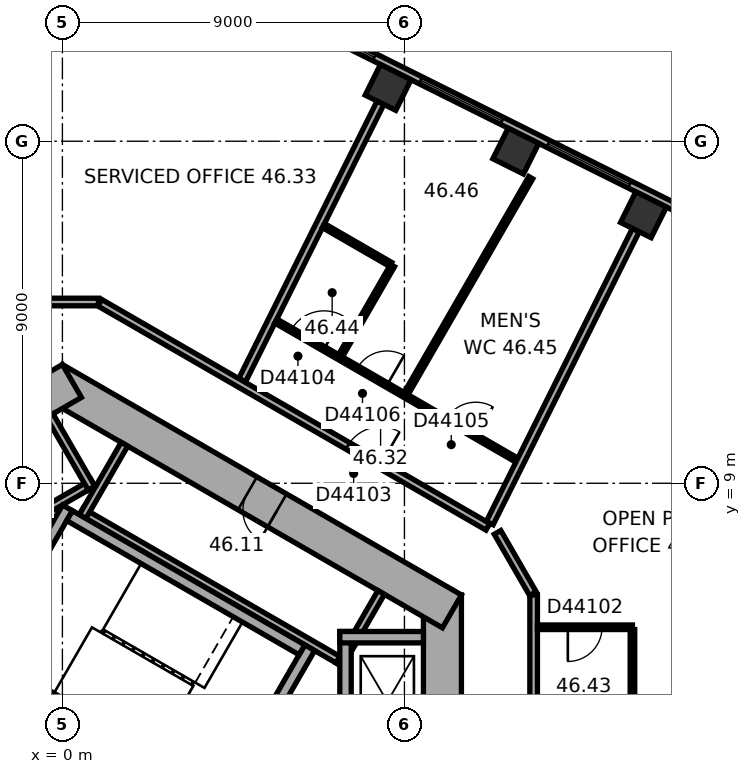
"""IFC4 building model, lengths in metres.
Left out: names, types, materials, properties, quantities, classifications, styles, units other than length and angle.
Written with IfcOpenShell. Run it as: python <this file> out.ifc"""

import sys

from ifc_helpers import new_model, si_unit, direction, frame, frame_2d, origin, origin_2d, place, context, subcontext, project, spatial, rectangle, extrude, element, fill, save


model = new_model("IFC4")
c1 = context("Model", 3, precision=1e-05, world=origin(), true_north=direction((0.0, 1.0)))
c2 = subcontext(c1, "Body", "Model", "MODEL_VIEW")
j1 = project(units=[si_unit("LENGTHUNIT", "METRE"), si_unit("PLANEANGLEUNIT", "RADIAN")], contexts=[c1])
p1 = place(None, origin())
s1 = spatial("IfcSite", under=j1, at=p1, CompositionType="ELEMENT")
p2 = place(p1, origin())
s2 = spatial("IfcBuilding", under=s1, at=p2, CompositionType="ELEMENT")
p3 = place(p2, frame((0.0, 0.0, 187.3)))
s3 = spatial("IfcBuildingStorey", under=s2, at=p3, CompositionType="ELEMENT", Elevation=187.3)
for number, where, z_axis, x_axis in (
    (1, (15.29, 16.065, 0.0), (0.0, 0.0, 1.0), (-0.895, 0.446, 0.0)),
    (2, (11.931, 17.74, 0.0), (0.0, 0.0, 1.0), (-0.895, 0.446, 0.0)),
    (3, (8.571, 19.416, 0.0), (0.0, 0.0, 1.0), (-0.895, 0.446, 0.0)),
):
    element("IfcColumn", number, at=place(p3, frame(where, z_axis=z_axis, x_axis=x_axis)), inside=s3, PredefinedType="COLUMN", context=c2, shape_type="SweptSolid", body=[
        extrude(rectangle(XDim=0.9, YDim=0.9, at=origin_2d()), origin(), (0.0, 0.0, 1.0), 3.7),
    ])
p4 = place(p3, frame((10.0, -6.062, 0.0), z_axis=(0.0, 0.0, 1.0), x_axis=(0.0, 1.0, 0.0)))
e4 = element("IfcWall", 4, at=p4, inside=s3, PredefinedType="SHEAR", context=c2, shape_type="SweptSolid", body=[
    extrude(rectangle(XDim=12.125, YDim=1.0, at=frame_2d((6.062, 0.0))), origin(), (0.0, 0.0, 1.0), 3.7),
])
p5 = place(p4, frame((6.262, 0.0, 0.0)))
e5 = element("IfcOpeningElement", 5, at=p5, cuts=e4, PredefinedType="OPENING", context=c2, shape_type="SweptSolid", body=[
    extrude(rectangle(XDim=1.5, YDim=2.1, at=frame_2d((0.75, 1.05))), frame((0.0, 0.51, 0.0), z_axis=(0.0, -1.0, 0.0), x_axis=(1.0, 0.0, 0.0)), (0.0, 0.0, 1.0), 1.02),
])
p6 = place(p4, frame((3.112, 0.0, 0.0)))
e6 = element("IfcOpeningElement", 6, at=p6, cuts=e4, PredefinedType="OPENING", context=c2, shape_type="SweptSolid", body=[
    extrude(rectangle(XDim=0.9, YDim=2.1, at=frame_2d((0.45, 1.05))), frame((0.0, 0.51, 0.0), z_axis=(0.0, -1.0, 0.0), x_axis=(1.0, 0.0, 0.0)), (0.0, 0.0, 1.0), 1.02),
])
p7 = place(p3, frame((10.25, 5.629, 0.0), z_axis=(0.0, 0.0, 1.0), x_axis=(-0.866022616891, 0.50000482701, 0.0)))
e7 = element("IfcWall", 7, at=p7, inside=s3, PredefinedType="SHEAR", context=c2, shape_type="SweptSolid", body=[
    extrude(rectangle(XDim=12.125, YDim=1.0, at=frame_2d((6.062, 0.0))), origin(), (0.0, 0.0, 1.0), 3.7),
])
p8 = place(p7, frame((5.312, 0.0, 0.0)))
e8 = element("IfcOpeningElement", 8, at=p8, cuts=e7, PredefinedType="OPENING", context=c2, shape_type="SweptSolid", body=[
    extrude(rectangle(XDim=0.9, YDim=2.1, at=frame_2d((0.45, 1.05))), frame((0.0, 0.51, 0.0), z_axis=(0.0, -1.0, 0.0), x_axis=(1.0, 0.0, 0.0)), (0.0, 0.0, 1.0), 1.02),
])
p9 = place(p3, frame((0.25, 11.691, 0.0), z_axis=(0.0, 0.0, 1.0), x_axis=(-0.866022616891, -0.50000482701, 0.0)))
e9 = element("IfcWall", 9, at=p9, inside=s3, PredefinedType="SHEAR", context=c2, shape_type="SweptSolid", body=[
    extrude(rectangle(XDim=12.125, YDim=1.0, at=frame_2d((6.062, 0.0))), origin(), (0.0, 0.0, 1.0), 3.7),
])
p10 = place(p9, frame((6.262, 0.0, 0.0)))
e10 = element("IfcOpeningElement", 10, at=p10, cuts=e9, PredefinedType="OPENING", context=c2, shape_type="SweptSolid", body=[
    extrude(rectangle(XDim=1.5, YDim=2.1, at=frame_2d((0.75, 1.05))), frame((0.0, 0.51, 0.0), z_axis=(0.0, -1.0, 0.0), x_axis=(1.0, 0.0, 0.0)), (0.0, 0.0, 1.0), 1.02),
])
p11 = place(p9, frame((1.812, 0.0, 0.0)))
e11 = element("IfcOpeningElement", 11, at=p11, cuts=e9, PredefinedType="OPENING", context=c2, shape_type="SweptSolid", body=[
    extrude(rectangle(XDim=0.9, YDim=2.1, at=frame_2d((0.45, 1.05))), frame((0.0, 0.51, 0.0), z_axis=(0.0, -1.0, 0.0), x_axis=(1.0, 0.0, 0.0)), (0.0, 0.0, 1.0), 1.02),
])
p12 = place(p9, frame((4.412, 0.0, 0.0)))
e12 = element("IfcOpeningElement", 12, at=p12, cuts=e9, PredefinedType="OPENING", context=c2, shape_type="SweptSolid", body=[
    extrude(rectangle(XDim=0.9, YDim=2.1, at=frame_2d((0.45, 1.05))), frame((0.0, 0.51, 0.0), z_axis=(0.0, -1.0, 0.0), x_axis=(1.0, 0.0, 0.0)), (0.0, 0.0, 1.0), 1.02),
])
p13 = place(p3, frame((19.464, 14.599, 0.0), z_axis=(0.0, 0.0, 1.0), x_axis=(-0.894935755043, 0.446195018289, 0.0)))
e13 = element("IfcWall", 13, at=p13, inside=s3, PredefinedType="STANDARD", context=c2, shape_type="SweptSolid", body=[
    extrude(rectangle(XDim=20.044, YDim=0.2, at=frame_2d((10.022, 0.0))), origin(), (0.0, 0.0, 1.0), 3.7),
])
p14 = place(p13, frame((1.313, 0.0, 0.9)))
e14 = element("IfcOpeningElement", 14, at=p14, cuts=e13, PredefinedType="OPENING", context=c2, shape_type="SweptSolid", body=[
    extrude(rectangle(XDim=2.4, YDim=2.0, at=frame_2d((1.2, 1.0))), frame((0.0, 0.11, 0.0), z_axis=(0.0, -1.0, 0.0), x_axis=(1.0, 0.0, 0.0)), (0.0, 0.0, 1.0), 0.22),
])
p15 = place(p13, frame((5.067, 0.0, 0.9)))
e15 = element("IfcOpeningElement", 15, at=p15, cuts=e13, PredefinedType="OPENING", context=c2, shape_type="SweptSolid", body=[
    extrude(rectangle(XDim=2.4, YDim=2.0, at=frame_2d((1.2, 1.0))), frame((0.0, 0.11, 0.0), z_axis=(0.0, -1.0, 0.0), x_axis=(1.0, 0.0, 0.0)), (0.0, 0.0, 1.0), 0.22),
])
p16 = place(p13, frame((8.821, 0.0, 0.9)))
e16 = element("IfcOpeningElement", 16, at=p16, cuts=e13, PredefinedType="OPENING", context=c2, shape_type="SweptSolid", body=[
    extrude(rectangle(XDim=2.4, YDim=2.0, at=frame_2d((1.2, 1.0))), frame((0.0, 0.11, 0.0), z_axis=(0.0, -1.0, 0.0), x_axis=(1.0, 0.0, 0.0)), (0.0, 0.0, 1.0), 0.22),
])
p17 = place(p13, frame((12.575, 0.0, 0.9)))
e17 = element("IfcOpeningElement", 17, at=p17, cuts=e13, PredefinedType="OPENING", context=c2, shape_type="SweptSolid", body=[
    extrude(rectangle(XDim=2.4, YDim=2.0, at=frame_2d((1.2, 1.0))), frame((0.0, 0.11, 0.0), z_axis=(0.0, -1.0, 0.0), x_axis=(1.0, 0.0, 0.0)), (0.0, 0.0, 1.0), 0.22),
])
p18 = place(p13, frame((16.329, 0.0, 0.9)))
e18 = element("IfcOpeningElement", 18, at=p18, cuts=e13, PredefinedType="OPENING", context=c2, shape_type="SweptSolid", body=[
    extrude(rectangle(XDim=2.4, YDim=2.0, at=frame_2d((1.2, 1.0))), frame((0.0, 0.11, 0.0), z_axis=(0.0, -1.0, 0.0), x_axis=(1.0, 0.0, 0.0)), (0.0, 0.0, 1.0), 0.22),
])
p19 = place(p3, frame((7.424, 4.259, 0.0), z_axis=(0.0, 0.0, 1.0), x_axis=(-0.866026010844, 0.49999894854, 0.0)))
e19 = element("IfcWall", 19, at=p19, inside=s3, PredefinedType="PARTITIONING", context=c2, shape_type="SweptSolid", body=[
    extrude(rectangle(XDim=8.0, YDim=0.2, at=frame_2d((4.0, 0.0))), origin(), (0.0, 0.0, 1.0), 3.42),
])
for number, where, z_axis, x_axis in (
    (20, (7.287, 4.222, 0.0), (0.0, 0.0, 1.0), (0.5, 0.866, 0.0)),
    (21, (0.532, 8.122, 0.0), (0.0, 0.0, 1.0), (0.5, 0.866, 0.0)),
):
    element("IfcWall", number, at=place(p3, frame(where, z_axis=z_axis, x_axis=x_axis)), inside=s3, PredefinedType="PARTITIONING", context=c2, shape_type="SweptSolid", body=[
        extrude(rectangle(XDim=2.2, YDim=0.2, at=frame_2d((1.1, 0.0))), origin(), (0.0, 0.0, 1.0), 3.42),
    ])
p20 = place(p3, frame((0.803, 9.009, 0.0), z_axis=(0.0, 0.0, 1.0), x_axis=(-0.866028230842, -0.499995103361, 0.0)))
e22 = element("IfcWall", 22, at=p20, inside=s3, PredefinedType="PARTITIONING", context=c2, shape_type="SweptSolid", body=[
    extrude(rectangle(XDim=5.4, YDim=0.2, at=frame_2d((2.7, 0.0))), origin(), (0.0, 0.0, 1.0), 3.42),
])
p21 = place(p3, frame((0.767, 8.872, 0.0), z_axis=(0.0, 0.0, 1.0), x_axis=(-0.499994660107, 0.866028486751, 0.0)))
e23 = element("IfcWall", 23, at=p21, inside=s3, PredefinedType="PARTITIONING", context=c2, shape_type="SweptSolid", body=[
    extrude(rectangle(XDim=2.2, YDim=0.2, at=frame_2d((1.1, 0.0))), origin(), (0.0, 0.0, 1.0), 3.42),
])
p22 = place(p3, frame((4.158, 0.602, 0.0), z_axis=(0.0, 0.0, 1.0), x_axis=(0.499977259774, 0.866038532462, 0.0)))
e24 = element("IfcWall", 24, at=p22, inside=s3, PredefinedType="SHEAR", context=c2, shape_type="SweptSolid", body=[
    extrude(rectangle(XDim=4.7, YDim=0.3, at=frame_2d((2.35, 0.0))), origin(), (0.0, 0.0, 1.0), 3.42),
])
p23 = place(p22, frame((0.8, 0.0, 0.0)))
e25 = element("IfcOpeningElement", 25, at=p23, cuts=e24, PredefinedType="OPENING", context=c2, shape_type="SweptSolid", body=[
    extrude(rectangle(XDim=1.2, YDim=2.1, at=frame_2d((0.6, 1.05))), frame((0.0, 0.16, 0.0), z_axis=(0.0, -1.0, 0.0), x_axis=(1.0, 0.0, 0.0)), (0.0, 0.0, 1.0), 0.32),
])
p24 = place(p3, frame((-2.216, 4.282, 0.0), z_axis=(0.0, 0.0, 1.0), x_axis=(0.499977259774, 0.866038532462, 0.0)))
e26 = element("IfcWall", 26, at=p24, inside=s3, PredefinedType="SHEAR", context=c2, shape_type="SweptSolid", body=[
    extrude(rectangle(XDim=4.7, YDim=0.3, at=frame_2d((2.35, 0.0))), origin(), (0.0, 0.0, 1.0), 3.42),
])
for number, where, z_axis, x_axis in (
    (27, (4.103, 0.807, 0.0), (0.0, 0.0, 1.0), (-0.866, 0.5, 0.0)),
    (28, (6.303, 4.617, 0.0), (0.0, 0.0, 1.0), (-0.866, 0.5, 0.0)),
):
    element("IfcWall", number, at=place(p3, frame(where, z_axis=z_axis, x_axis=x_axis)), inside=s3, PredefinedType="SHEAR", context=c2, shape_type="SweptSolid", body=[
        extrude(rectangle(XDim=7.06, YDim=0.3, at=frame_2d((3.53, 0.0))), origin(), (0.0, 0.0, 1.0), 3.42),
    ])
p25 = place(p3, frame((7.45, 1.75, 0.0), z_axis=(0.0, 0.0, 1.0), x_axis=(0.0, 1.0, 0.0)))
e29 = element("IfcWall", 29, at=p25, inside=s3, PredefinedType="SHEAR", context=c2, shape_type="SweptSolid", body=[
    extrude(rectangle(XDim=3.35, YDim=0.3, at=frame_2d((1.675, 0.0))), origin(), (0.0, 0.0, 1.0), 3.42),
])
p26 = place(p3, frame((7.3, 4.95, 0.0), z_axis=(0.0, 0.0, 1.0), x_axis=(1.0, 0.0, 0.0)))
e30 = element("IfcWall", 30, at=p26, inside=s3, PredefinedType="SHEAR", context=c2, shape_type="SweptSolid", body=[
    extrude(rectangle(XDim=2.2, YDim=0.3, at=frame_2d((1.1, 0.0))), origin(), (0.0, 0.0, 1.0), 3.42),
])
p27 = place(p3, frame((0.95, 13.77, 0.0), z_axis=(0.0, 0.0, 1.0), x_axis=(-1.0, 0.0, 0.0)))
e31 = element("IfcWall", 31, at=p27, inside=s3, PredefinedType="PARTITIONING", context=c2, shape_type="SweptSolid", body=[
    extrude(rectangle(XDim=1.9, YDim=0.2, at=frame_2d((0.95, 0.0))), origin(), (0.0, 0.0, 1.0), 3.42),
])
p28 = place(p3, frame((7.318, 12.356, 0.0), z_axis=(0.0, 0.0, 1.0), x_axis=(0.499982138324, 0.866035715982, 0.0)))
e32 = element("IfcWall", 32, at=p28, inside=s3, PredefinedType="PARTITIONING", context=c2, shape_type="SweptSolid", body=[
    extrude(rectangle(XDim=2.74, YDim=0.12, at=frame_2d((1.37, 0.0))), origin(), (0.0, 0.0, 1.0), 3.42),
])
p29 = place(p3, frame((8.37, 19.013, 0.0), z_axis=(0.0, 0.0, 1.0), x_axis=(-0.446183598632, -0.894941448538, 0.0)))
e33 = element("IfcWall", 33, at=p29, inside=s3, PredefinedType="PARTITIONING", context=c2, shape_type="SweptSolid", body=[
    extrude(rectangle(XDim=8.156, YDim=0.2, at=frame_2d((4.078, 0.0))), origin(), (0.0, 0.0, 1.0), 3.42),
])
p30 = place(p3, frame((8.636, 14.759, 0.0), z_axis=(0.0, 0.0, 1.0), x_axis=(-0.866010195725, 0.500026340207, 0.0)))
e34 = element("IfcWall", 34, at=p30, inside=s3, PredefinedType="PARTITIONING", context=c2, shape_type="SweptSolid", body=[
    extrude(rectangle(XDim=2.04, YDim=0.12, at=frame_2d((1.02, 0.0))), origin(), (0.0, 0.0, 1.0), 3.42),
])
p31 = place(p3, frame((11.196, 7.854, 0.0), z_axis=(0.0, 0.0, 1.0), x_axis=(-0.866023877043, 0.500002644385, 0.0)))
e35 = element("IfcWall", 35, at=p31, inside=s3, PredefinedType="PARTITIONING", context=c2, shape_type="SweptSolid", body=[
    extrude(rectangle(XDim=11.792, YDim=0.2, at=frame_2d((5.896, 0.0))), origin(), (0.0, 0.0, 1.0), 3.42),
])
p32 = place(p31, frame((3.261, 0.0, 0.0)))
e36 = element("IfcOpeningElement", 36, at=p32, cuts=e35, PredefinedType="OPENING", context=c2, shape_type="SweptSolid", body=[
    extrude(rectangle(XDim=1.0, YDim=2.1, at=frame_2d((0.5, 1.05))), frame((0.0, 0.11, 0.0), z_axis=(0.0, -1.0, 0.0), x_axis=(1.0, 0.0, 0.0)), (0.0, 0.0, 1.0), 0.22),
])
p33 = place(p3, frame((11.959, 9.608, 0.0), z_axis=(0.0, 0.0, 1.0), x_axis=(-0.866018452427, 0.500012039911, 0.0)))
e37 = element("IfcWall", 37, at=p33, inside=s3, PredefinedType="PARTITIONING", context=c2, shape_type="SweptSolid", body=[
    extrude(rectangle(XDim=7.322, YDim=0.12, at=frame_2d((3.661, 0.0))), origin(), (0.0, 0.0, 1.0), 3.42),
])
p34 = place(p33, frame((5.858, 0.0, 0.0)))
e38 = element("IfcOpeningElement", 38, at=p34, cuts=e37, PredefinedType="OPENING", context=c2, shape_type="SweptSolid", body=[
    extrude(rectangle(XDim=1.0, YDim=2.1, at=frame_2d((0.5, 1.05))), frame((0.0, 0.07, 0.0), z_axis=(0.0, -1.0, 0.0), x_axis=(1.0, 0.0, 0.0)), (0.0, 0.0, 1.0), 0.14),
])
p35 = place(p33, frame((1.25, 0.0, 0.0)))
e39 = element("IfcOpeningElement", 39, at=p35, cuts=e37, PredefinedType="OPENING", context=c2, shape_type="SweptSolid", body=[
    extrude(rectangle(XDim=0.9, YDim=2.1, at=frame_2d((0.45, 1.05))), frame((0.0, 0.07, 0.0), z_axis=(0.0, -1.0, 0.0), x_axis=(1.0, 0.0, 0.0)), (0.0, 0.0, 1.0), 0.14),
])
p36 = place(p33, frame((3.947, 0.0, 0.0)))
e40 = element("IfcOpeningElement", 40, at=p36, cuts=e37, PredefinedType="OPENING", context=c2, shape_type="SweptSolid", body=[
    extrude(rectangle(XDim=0.9, YDim=2.1, at=frame_2d((0.45, 1.05))), frame((0.0, 0.07, 0.0), z_axis=(0.0, -1.0, 0.0), x_axis=(1.0, 0.0, 0.0)), (0.0, 0.0, 1.0), 0.14),
])
p37 = place(p3, frame((12.325, 17.041, 0.0), z_axis=(0.0, 0.0, 1.0), x_axis=(-0.499985538654, -0.866033752885, 0.0)))
e41 = element("IfcWall", 41, at=p37, inside=s3, PredefinedType="PARTITIONING", context=c2, shape_type="SweptSolid", body=[
    extrude(rectangle(XDim=6.56, YDim=0.12, at=frame_2d((3.28, 0.0))), origin(), (0.0, 0.0, 1.0), 3.42),
])
p38 = place(p3, frame((12.38, 6.097, 0.0), z_axis=(0.0, 0.0, 1.0), x_axis=(-0.499964847546, 0.866045698112, 0.0)))
e42 = element("IfcWall", 42, at=p38, inside=s3, PredefinedType="PARTITIONING", context=c2, shape_type="SweptSolid", body=[
    extrude(rectangle(XDim=1.86, YDim=0.2, at=frame_2d((0.93, 0.0))), origin(), (0.0, 0.0, 1.0), 3.42),
])
p39 = place(p3, frame((12.4, 3.011, 0.0), z_axis=(0.0, 0.0, 1.0), x_axis=(0.0, 1.0, 0.0)))
e43 = element("IfcWall", 43, at=p39, inside=s3, PredefinedType="PARTITIONING", context=c2, shape_type="SweptSolid", body=[
    extrude(rectangle(XDim=3.051, YDim=0.2, at=frame_2d((1.525, 0.0))), origin(), (0.0, 0.0, 1.0), 3.42),
])
p40 = place(p3, frame((12.5, 5.211, 0.0), z_axis=(0.0, 0.0, 1.0), x_axis=(1.0, 0.0, 0.0)))
e44 = element("IfcWall", 44, at=p40, inside=s3, PredefinedType="PARTITIONING", context=c2, shape_type="SweptSolid", body=[
    extrude(rectangle(XDim=2.5, YDim=0.12, at=frame_2d((1.25, 0.0))), origin(), (0.0, 0.0, 1.0), 3.42),
])
p41 = place(p40, frame((0.8, 0.0, 0.0)))
e45 = element("IfcOpeningElement", 45, at=p41, cuts=e44, PredefinedType="OPENING", context=c2, shape_type="SweptSolid", body=[
    extrude(rectangle(XDim=0.9, YDim=2.1, at=frame_2d((0.45, 1.05))), frame((0.0, 0.07, 0.0), z_axis=(0.0, -1.0, 0.0), x_axis=(1.0, 0.0, 0.0)), (0.0, 0.0, 1.0), 0.14),
])
p42 = place(p3, frame((15.0, 5.151, 0.0), z_axis=(0.0, 0.0, 1.0), x_axis=(0.0, -1.0, 0.0)))
e46 = element("IfcWall", 46, at=p42, inside=s3, PredefinedType="PARTITIONING", context=c2, shape_type="SweptSolid", body=[
    extrude(rectangle(XDim=2.08, YDim=0.12, at=frame_2d((1.04, 0.0))), origin(), (0.0, 0.0, 1.0), 3.42),
])
p43 = place(p3, frame((15.09, 15.663, 0.0), z_axis=(0.0, 0.0, 1.0), x_axis=(-0.446204491029, -0.894931032083, 0.0)))
e47 = element("IfcWall", 47, at=p43, inside=s3, PredefinedType="PARTITIONING", context=c2, shape_type="SweptSolid", body=[
    extrude(rectangle(XDim=8.615, YDim=0.2, at=frame_2d((4.308, 0.0))), origin(), (0.0, 0.0, 1.0), 3.42),
])
p44 = place(p15, origin())
e48 = element("IfcWindow", 48, at=p44, inside=s3, PartitioningType="SINGLE_PANEL", PredefinedType="WINDOW", context=c2, shape_type="SweptSolid", body=[
    extrude(rectangle(XDim=2.4, YDim=2.0, at=frame_2d((1.2, 1.0))), frame((0.0, 0.03, 0.0), z_axis=(0.0, -1.0, 0.0), x_axis=(1.0, 0.0, 0.0)), (0.0, 0.0, 1.0), 0.06),
])
fill(e15, e48)
p45 = place(p16, origin())
e49 = element("IfcWindow", 49, at=p45, inside=s3, PartitioningType="SINGLE_PANEL", PredefinedType="WINDOW", context=c2, shape_type="SweptSolid", body=[
    extrude(rectangle(XDim=2.4, YDim=2.0, at=frame_2d((1.2, 1.0))), frame((0.0, 0.03, 0.0), z_axis=(0.0, -1.0, 0.0), x_axis=(1.0, 0.0, 0.0)), (0.0, 0.0, 1.0), 0.06),
])
fill(e16, e49)
p46 = place(p17, origin())
e50 = element("IfcWindow", 50, at=p46, inside=s3, PartitioningType="SINGLE_PANEL", PredefinedType="WINDOW", context=c2, shape_type="SweptSolid", body=[
    extrude(rectangle(XDim=2.4, YDim=2.0, at=frame_2d((1.2, 1.0))), frame((0.0, 0.03, 0.0), z_axis=(0.0, -1.0, 0.0), x_axis=(1.0, 0.0, 0.0)), (0.0, 0.0, 1.0), 0.06),
])
fill(e17, e50)
p47 = place(p8, origin())
e51 = element("IfcDoor", 51, at=p47, inside=s3, OperationType="SINGLE_SWING_LEFT", PredefinedType="DOOR", context=c2, shape_type="SweptSolid", body=[
    extrude(rectangle(XDim=0.9, YDim=2.1, at=frame_2d((0.45, 1.05))), frame((0.0, 0.025, 0.0), z_axis=(0.0, -1.0, 0.0), x_axis=(1.0, 0.0, 0.0)), (0.0, 0.0, 1.0), 0.05),
])
fill(e8, e51)
p48 = place(p41, origin())
e52 = element("IfcDoor", 52, at=p48, inside=s3, OperationType="SINGLE_SWING_LEFT", PredefinedType="DOOR", context=c2, shape_type="SweptSolid", body=[
    extrude(rectangle(XDim=0.9, YDim=2.1, at=frame_2d((0.45, 1.05))), frame((0.0, 0.025, 0.0), z_axis=(0.0, -1.0, 0.0), x_axis=(1.0, 0.0, 0.0)), (0.0, 0.0, 1.0), 0.05),
])
fill(e45, e52)
p49 = place(p32, origin())
e53 = element("IfcDoor", 53, at=p49, inside=s3, OperationType="SINGLE_SWING_LEFT", PredefinedType="DOOR", context=c2, shape_type="SweptSolid", body=[
    extrude(rectangle(XDim=1.0, YDim=2.1, at=frame_2d((0.5, 1.05))), frame((0.0, 0.025, 0.0), z_axis=(0.0, -1.0, 0.0), x_axis=(1.0, 0.0, 0.0)), (0.0, 0.0, 1.0), 0.05),
])
fill(e36, e53)
p50 = place(p34, origin())
e54 = element("IfcDoor", 54, at=p50, inside=s3, OperationType="SINGLE_SWING_LEFT", PredefinedType="DOOR", context=c2, shape_type="SweptSolid", body=[
    extrude(rectangle(XDim=1.0, YDim=2.1, at=frame_2d((0.5, 1.05))), frame((0.0, 0.025, 0.0), z_axis=(0.0, -1.0, 0.0), x_axis=(1.0, 0.0, 0.0)), (0.0, 0.0, 1.0), 0.05),
])
fill(e38, e54)
p51 = place(p35, origin())
e55 = element("IfcDoor", 55, at=p51, inside=s3, OperationType="SINGLE_SWING_LEFT", PredefinedType="DOOR", context=c2, shape_type="SweptSolid", body=[
    extrude(rectangle(XDim=0.9, YDim=2.1, at=frame_2d((0.45, 1.05))), frame((0.0, 0.025, 0.0), z_axis=(0.0, -1.0, 0.0), x_axis=(1.0, 0.0, 0.0)), (0.0, 0.0, 1.0), 0.05),
])
fill(e39, e55)
p52 = place(p36, origin())
e56 = element("IfcDoor", 56, at=p52, inside=s3, OperationType="SINGLE_SWING_LEFT", PredefinedType="DOOR", context=c2, shape_type="SweptSolid", body=[
    extrude(rectangle(XDim=0.9, YDim=2.1, at=frame_2d((0.45, 1.05))), frame((0.0, 0.025, 0.0), z_axis=(0.0, -1.0, 0.0), x_axis=(1.0, 0.0, 0.0)), (0.0, 0.0, 1.0), 0.05),
])
fill(e40, e56)
save(model, sys.argv[1])
